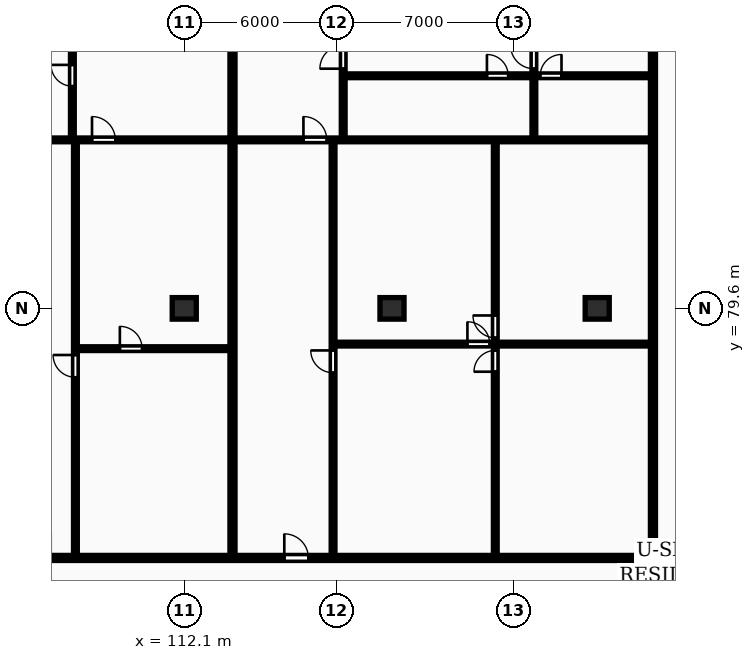
"""IFC4 building model, lengths in metres.
Left out: names, types, materials, properties, quantities, classifications, styles, units other than length and angle.
Written with IfcOpenShell. Run it as: python <this file> out.ifc"""

import sys

from ifc_helpers import new_model, si_unit, direction, frame, frame_2d, origin, origin_2d, place, context, subcontext, project, spatial, rectangle, extrude, element, fill, save


model = new_model("IFC4")
c1 = context("Model", 3, precision=1e-05, world=origin(), true_north=direction((0.0, 1.0)))
c2 = subcontext(c1, "Body", "Model", "MODEL_VIEW")
j1 = project(units=[si_unit("LENGTHUNIT", "METRE"), si_unit("PLANEANGLEUNIT", "RADIAN")], contexts=[c1])
p1 = place(None, origin())
s1 = spatial("IfcSite", under=j1, at=p1, CompositionType="ELEMENT")
p2 = place(p1, origin())
s2 = spatial("IfcBuilding", under=s1, at=p2, CompositionType="ELEMENT")
p3 = place(p2, frame((0.0, 0.0, 100.3)))
s3 = spatial("IfcBuildingStorey", under=s2, at=p3, CompositionType="ELEMENT", Elevation=100.3)
for number, where, z_axis, x_axis in (
    (1, (112.1, 79.6, 0.0), (0.0, 0.0, 1.0), (1.0, 0.0, 0.0)),
    (2, (120.3, 79.6, 0.0), (0.0, 0.0, 1.0), (1.0, 0.0, 0.0)),
    (3, (128.4, 79.6, 0.0), (0.0, 0.0, 1.0), (1.0, 0.0, 0.0)),
):
    element("IfcColumn", number, at=place(p3, frame(where, z_axis=z_axis, x_axis=x_axis)), inside=s3, PredefinedType="COLUMN", context=c2, shape_type="SweptSolid", body=[
        extrude(rectangle(XDim=0.95, YDim=0.85, at=origin_2d()), origin(), (0.0, 0.0, 1.0), 3.25),
    ])
for number, where, z_axis, x_axis in (
    (4, (130.6, 69.83, 0.0), (0.0, 0.0, 1.0), (0.0, 1.0, 0.0)),
    (5, (114.004, 69.83, 0.0), (0.0, 0.0, 1.0), (0.0, 1.0, 0.0)),
):
    element("IfcWall", number, at=place(p3, frame(where, z_axis=z_axis, x_axis=x_axis)), inside=s3, PredefinedType="PARTITIONING", context=c2, shape_type="SweptSolid", body=[
        extrude(rectangle(XDim=26.07, YDim=0.2, at=frame_2d((13.035, 0.0))), origin(), (0.0, 0.0, 1.0), 2.97),
    ])
p4 = place(p3, frame((107.864, 78.01, 0.0), z_axis=(0.0, 0.0, 1.0), x_axis=(1.0, 0.0, 0.0)))
e6 = element("IfcWall", 6, at=p4, inside=s3, PredefinedType="PARTITIONING", context=c2, shape_type="SweptSolid", body=[
    extrude(rectangle(XDim=6.06, YDim=0.15, at=frame_2d((3.03, 0.0))), origin(), (0.0, 0.0, 1.0), 2.97),
])
p5 = place(p4, frame((1.694, 0.0, 0.0)))
e7 = element("IfcOpeningElement", 7, at=p5, cuts=e6, PredefinedType="OPENING", context=c2, shape_type="SweptSolid", body=[
    extrude(rectangle(XDim=0.88, YDim=2.06, at=frame_2d((0.44, 1.03))), frame((0.0, 0.085, 0.0), z_axis=(0.0, -1.0, 0.0), x_axis=(1.0, 0.0, 0.0)), (0.0, 0.0, 1.0), 0.17),
])
p6 = place(p3, frame((107.804, 69.81, 0.0), z_axis=(0.0, 0.0, 1.0), x_axis=(0.0, 1.0, 0.0)))
e8 = element("IfcWall", 8, at=p6, inside=s3, PredefinedType="PARTITIONING", context=c2, shape_type="SweptSolid", body=[
    extrude(rectangle(XDim=16.4, YDim=0.15, at=frame_2d((8.2, 0.0))), origin(), (0.0, 0.0, 1.0), 2.97),
])
p7 = place(p6, frame((7.07, 0.0, 0.0)))
e9 = element("IfcOpeningElement", 9, at=p7, cuts=e8, PredefinedType="OPENING", context=c2, shape_type="SweptSolid", body=[
    extrude(rectangle(XDim=0.88, YDim=2.06, at=frame_2d((0.44, 1.03))), frame((0.0, 0.085, 0.0), z_axis=(0.0, -1.0, 0.0), x_axis=(1.0, 0.0, 0.0)), (0.0, 0.0, 1.0), 0.17),
])
p8 = place(p3, frame((107.684, 86.29, 0.0), z_axis=(0.0, 0.0, 1.0), x_axis=(0.0, 1.0, 0.0)))
e10 = element("IfcWall", 10, at=p8, inside=s3, PredefinedType="PARTITIONING", context=c2, shape_type="SweptSolid", body=[
    extrude(rectangle(XDim=5.0, YDim=0.15, at=frame_2d((2.5, 0.0))), origin(), (0.0, 0.0, 1.0), 2.97),
])
p9 = place(p8, frame((2.08, 0.0, 0.0)))
e11 = element("IfcOpeningElement", 11, at=p9, cuts=e10, PredefinedType="OPENING", context=c2, shape_type="SweptSolid", body=[
    extrude(rectangle(XDim=0.84, YDim=2.04, at=frame_2d((0.42, 1.02))), frame((0.0, 0.085, 0.0), z_axis=(0.0, -1.0, 0.0), x_axis=(1.0, 0.0, 0.0)), (0.0, 0.0, 1.0), 0.17),
])
p10 = place(p3, frame((103.914, 86.25, 0.0), z_axis=(0.0, 0.0, 1.0), x_axis=(1.0, 0.0, 0.0)))
e12 = element("IfcWall", 12, at=p10, inside=s3, PredefinedType="PARTITIONING", context=c2, shape_type="SweptSolid", body=[
    extrude(rectangle(XDim=10.01, YDim=0.15, at=frame_2d((5.005, 0.0))), origin(), (0.0, 0.0, 1.0), 2.97),
])
p11 = place(p10, frame((4.545, 0.0, 0.0)))
e13 = element("IfcOpeningElement", 13, at=p11, cuts=e12, PredefinedType="OPENING", context=c2, shape_type="SweptSolid", body=[
    extrude(rectangle(XDim=0.92, YDim=2.08, at=frame_2d((0.46, 1.04))), frame((0.0, 0.085, 0.0), z_axis=(0.0, -1.0, 0.0), x_axis=(1.0, 0.0, 0.0)), (0.0, 0.0, 1.0), 0.17),
])
p12 = place(p3, frame((124.377, 69.81, 0.0), z_axis=(0.0, 0.0, 1.0), x_axis=(0.0, 1.0, 0.0)))
e14 = element("IfcWall", 14, at=p12, inside=s3, PredefinedType="PARTITIONING", context=c2, shape_type="SweptSolid", body=[
    extrude(rectangle(XDim=16.4, YDim=0.15, at=frame_2d((8.2, 0.0))), origin(), (0.0, 0.0, 1.0), 2.97),
])
p13 = place(p12, frame((7.29, 0.0, 0.0)))
e15 = element("IfcOpeningElement", 15, at=p13, cuts=e14, PredefinedType="OPENING", context=c2, shape_type="SweptSolid", body=[
    extrude(rectangle(XDim=0.84, YDim=2.04, at=frame_2d((0.42, 1.02))), frame((0.0, 0.085, 0.0), z_axis=(0.0, -1.0, 0.0), x_axis=(1.0, 0.0, 0.0)), (0.0, 0.0, 1.0), 0.17),
])
p14 = place(p12, frame((8.63, 0.0, 0.0)))
e16 = element("IfcOpeningElement", 16, at=p14, cuts=e14, PredefinedType="OPENING", context=c2, shape_type="SweptSolid", body=[
    extrude(rectangle(XDim=0.88, YDim=2.06, at=frame_2d((0.44, 1.03))), frame((0.0, 0.085, 0.0), z_axis=(0.0, -1.0, 0.0), x_axis=(1.0, 0.0, 0.0)), (0.0, 0.0, 1.0), 0.17),
])
p15 = place(p3, frame((118.034, 78.19, 0.0), z_axis=(0.0, 0.0, 1.0), x_axis=(1.0, 0.0, 0.0)))
e17 = element("IfcWall", 17, at=p15, inside=s3, PredefinedType="PARTITIONING", context=c2, shape_type="SweptSolid", body=[
    extrude(rectangle(XDim=12.486, YDim=0.15, at=frame_2d((6.243, 0.0))), origin(), (0.0, 0.0, 1.0), 2.97),
])
p16 = place(p15, frame((5.243, 0.0, 0.0)))
e18 = element("IfcOpeningElement", 18, at=p16, cuts=e17, PredefinedType="OPENING", context=c2, shape_type="SweptSolid", body=[
    extrude(rectangle(XDim=0.88, YDim=2.06, at=frame_2d((0.44, 1.03))), frame((0.0, 0.085, 0.0), z_axis=(0.0, -1.0, 0.0), x_axis=(1.0, 0.0, 0.0)), (0.0, 0.0, 1.0), 0.17),
])
p17 = place(p3, frame((117.974, 69.81, 0.0), z_axis=(0.0, 0.0, 1.0), x_axis=(0.0, 1.0, 0.0)))
e19 = element("IfcWall", 19, at=p17, inside=s3, PredefinedType="PARTITIONING", context=c2, shape_type="SweptSolid", body=[
    extrude(rectangle(XDim=16.4, YDim=0.15, at=frame_2d((8.2, 0.0))), origin(), (0.0, 0.0, 1.0), 2.97),
])
p18 = place(p17, frame((7.25, 0.0, 0.0)))
e20 = element("IfcOpeningElement", 20, at=p18, cuts=e19, PredefinedType="OPENING", context=c2, shape_type="SweptSolid", body=[
    extrude(rectangle(XDim=0.88, YDim=2.06, at=frame_2d((0.44, 1.03))), frame((0.0, 0.085, 0.0), z_axis=(0.0, -1.0, 0.0), x_axis=(1.0, 0.0, 0.0)), (0.0, 0.0, 1.0), 0.17),
])
p19 = place(p3, frame((118.374, 86.29, 0.0), z_axis=(0.0, 0.0, 1.0), x_axis=(0.0, 1.0, 0.0)))
e21 = element("IfcWall", 21, at=p19, inside=s3, PredefinedType="PARTITIONING", context=c2, shape_type="SweptSolid", body=[
    extrude(rectangle(XDim=9.61, YDim=0.15, at=frame_2d((4.805, 0.0))), origin(), (0.0, 0.0, 1.0), 2.97),
])
p20 = place(p19, frame((2.77, 0.0, 0.0)))
e22 = element("IfcOpeningElement", 22, at=p20, cuts=e21, PredefinedType="OPENING", context=c2, shape_type="SweptSolid", body=[
    extrude(rectangle(XDim=0.92, YDim=2.08, at=frame_2d((0.46, 1.04))), frame((0.0, 0.085, 0.0), z_axis=(0.0, -1.0, 0.0), x_axis=(1.0, 0.0, 0.0)), (0.0, 0.0, 1.0), 0.17),
])
p21 = place(p3, frame((125.9, 86.29, 0.0), z_axis=(0.0, 0.0, 1.0), x_axis=(0.0, 1.0, 0.0)))
e23 = element("IfcWall", 23, at=p21, inside=s3, PredefinedType="PARTITIONING", context=c2, shape_type="SweptSolid", body=[
    extrude(rectangle(XDim=2.47, YDim=0.15, at=frame_2d((1.235, 0.0))), origin(), (0.0, 0.0, 1.0), 2.97),
])
p22 = place(p3, frame((125.9, 88.8, 0.0), z_axis=(0.0, 0.0, 1.0), x_axis=(0.0, 1.0, 0.0)))
e24 = element("IfcWall", 24, at=p22, inside=s3, PredefinedType="PARTITIONING", context=c2, shape_type="SweptSolid", body=[
    extrude(rectangle(XDim=7.1, YDim=0.15, at=frame_2d((3.55, 0.0))), origin(), (0.0, 0.0, 1.0), 2.97),
])
p23 = place(p22, frame((0.26, 0.0, 0.0)))
e25 = element("IfcOpeningElement", 25, at=p23, cuts=e24, PredefinedType="OPENING", context=c2, shape_type="SweptSolid", body=[
    extrude(rectangle(XDim=0.92, YDim=2.08, at=frame_2d((0.46, 1.04))), frame((0.0, 0.085, 0.0), z_axis=(0.0, -1.0, 0.0), x_axis=(1.0, 0.0, 0.0)), (0.0, 0.0, 1.0), 0.17),
])
p24 = place(p3, frame((118.414, 88.78, 0.0), z_axis=(0.0, 0.0, 1.0), x_axis=(1.0, 0.0, 0.0)))
e26 = element("IfcWall", 26, at=p24, inside=s3, PredefinedType="PARTITIONING", context=c2, shape_type="SweptSolid", body=[
    extrude(rectangle(XDim=12.106, YDim=0.15, at=frame_2d((6.053, 0.0))), origin(), (0.0, 0.0, 1.0), 2.97),
])
p25 = place(p24, frame((5.633, 0.0, 0.0)))
e27 = element("IfcOpeningElement", 27, at=p25, cuts=e26, PredefinedType="OPENING", context=c2, shape_type="SweptSolid", body=[
    extrude(rectangle(XDim=0.84, YDim=2.04, at=frame_2d((0.42, 1.02))), frame((0.0, 0.085, 0.0), z_axis=(0.0, -1.0, 0.0), x_axis=(1.0, 0.0, 0.0)), (0.0, 0.0, 1.0), 0.17),
])
p26 = place(p24, frame((7.736, 0.0, 0.0)))
e28 = element("IfcOpeningElement", 28, at=p26, cuts=e26, PredefinedType="OPENING", context=c2, shape_type="SweptSolid", body=[
    extrude(rectangle(XDim=0.84, YDim=2.04, at=frame_2d((0.42, 1.02))), frame((0.0, 0.085, 0.0), z_axis=(0.0, -1.0, 0.0), x_axis=(1.0, 0.0, 0.0)), (0.0, 0.0, 1.0), 0.17),
])
p27 = place(p3, frame((114.084, 86.25, 0.0), z_axis=(0.0, 0.0, 1.0), x_axis=(1.0, 0.0, 0.0)))
e29 = element("IfcWall", 29, at=p27, inside=s3, PredefinedType="PARTITIONING", context=c2, shape_type="SweptSolid", body=[
    extrude(rectangle(XDim=16.436, YDim=0.15, at=frame_2d((8.218, 0.0))), origin(), (0.0, 0.0, 1.0), 2.97),
])
p28 = place(p27, frame((2.72, 0.0, 0.0)))
e30 = element("IfcOpeningElement", 30, at=p28, cuts=e29, PredefinedType="OPENING", context=c2, shape_type="SweptSolid", body=[
    extrude(rectangle(XDim=0.92, YDim=2.08, at=frame_2d((0.46, 1.04))), frame((0.0, 0.085, 0.0), z_axis=(0.0, -1.0, 0.0), x_axis=(1.0, 0.0, 0.0)), (0.0, 0.0, 1.0), 0.17),
])
p29 = place(p3, frame((57.6, 69.75, 0.0), z_axis=(0.0, 0.0, 1.0), x_axis=(1.0, 0.0, 0.0)))
e31 = element("IfcWall", 31, at=p29, inside=s3, PredefinedType="PARTITIONING", context=c2, shape_type="SweptSolid", body=[
    extrude(rectangle(XDim=73.0, YDim=0.2, at=frame_2d((36.5, 0.0))), origin(), (0.0, 0.0, 1.0), 2.97),
])
p30 = place(p29, frame((7.326, 0.0, 0.0)))
e32 = element("IfcOpeningElement", 32, at=p30, cuts=e31, PredefinedType="OPENING", context=c2, shape_type="SweptSolid", body=[
    extrude(rectangle(XDim=1.22, YDim=2.18, at=frame_2d((0.61, 1.09))), frame((0.0, 0.11, 0.0), z_axis=(0.0, -1.0, 0.0), x_axis=(1.0, 0.0, 0.0)), (0.0, 0.0, 1.0), 0.22),
])
p31 = place(p29, frame((23.795, 0.0, 0.0)))
e33 = element("IfcOpeningElement", 33, at=p31, cuts=e31, PredefinedType="OPENING", context=c2, shape_type="SweptSolid", body=[
    extrude(rectangle(XDim=1.22, YDim=2.18, at=frame_2d((0.61, 1.09))), frame((0.0, 0.11, 0.0), z_axis=(0.0, -1.0, 0.0), x_axis=(1.0, 0.0, 0.0)), (0.0, 0.0, 1.0), 0.22),
])
p32 = place(p29, frame((38.67, 0.0, 0.0)))
e34 = element("IfcOpeningElement", 34, at=p32, cuts=e31, PredefinedType="OPENING", context=c2, shape_type="SweptSolid", body=[
    extrude(rectangle(XDim=0.95, YDim=2.15, at=frame_2d((0.475, 1.075))), frame((0.0, 0.11, 0.0), z_axis=(0.0, -1.0, 0.0), x_axis=(1.0, 0.0, 0.0)), (0.0, 0.0, 1.0), 0.22),
])
p33 = place(p29, frame((48.279, 0.0, 0.0)))
e35 = element("IfcOpeningElement", 35, at=p33, cuts=e31, PredefinedType="OPENING", context=c2, shape_type="SweptSolid", body=[
    extrude(rectangle(XDim=0.95, YDim=2.15, at=frame_2d((0.475, 1.075))), frame((0.0, 0.11, 0.0), z_axis=(0.0, -1.0, 0.0), x_axis=(1.0, 0.0, 0.0)), (0.0, 0.0, 1.0), 0.22),
])
p34 = place(p29, frame((58.449, 0.0, 0.0)))
e36 = element("IfcOpeningElement", 36, at=p34, cuts=e31, PredefinedType="OPENING", context=c2, shape_type="SweptSolid", body=[
    extrude(rectangle(XDim=0.95, YDim=2.15, at=frame_2d((0.475, 1.075))), frame((0.0, 0.11, 0.0), z_axis=(0.0, -1.0, 0.0), x_axis=(1.0, 0.0, 0.0)), (0.0, 0.0, 1.0), 0.22),
])
p35 = place(p5, origin())
e37 = element("IfcDoor", 37, at=p35, inside=s3, OperationType="SINGLE_SWING_LEFT", PredefinedType="DOOR", context=c2, shape_type="SweptSolid", body=[
    extrude(rectangle(XDim=0.88, YDim=2.06, at=frame_2d((0.44, 1.03))), frame((0.0, 0.025, 0.0), z_axis=(0.0, -1.0, 0.0), x_axis=(1.0, 0.0, 0.0)), (0.0, 0.0, 1.0), 0.05),
])
fill(e7, e37)
p36 = place(p7, origin())
e38 = element("IfcDoor", 38, at=p36, inside=s3, OperationType="SINGLE_SWING_RIGHT", PredefinedType="DOOR", context=c2, shape_type="SweptSolid", body=[
    extrude(rectangle(XDim=0.88, YDim=2.06, at=frame_2d((0.44, 1.03))), frame((0.0, 0.025, 0.0), z_axis=(0.0, -1.0, 0.0), x_axis=(1.0, 0.0, 0.0)), (0.0, 0.0, 1.0), 0.05),
])
fill(e9, e38)
p37 = place(p9, origin())
e39 = element("IfcDoor", 39, at=p37, inside=s3, OperationType="SINGLE_SWING_RIGHT", PredefinedType="DOOR", context=c2, shape_type="SweptSolid", body=[
    extrude(rectangle(XDim=0.84, YDim=2.04, at=frame_2d((0.42, 1.02))), frame((0.0, 0.025, 0.0), z_axis=(0.0, -1.0, 0.0), x_axis=(1.0, 0.0, 0.0)), (0.0, 0.0, 1.0), 0.05),
])
fill(e11, e39)
p38 = place(p11, origin())
e40 = element("IfcDoor", 40, at=p38, inside=s3, OperationType="SINGLE_SWING_LEFT", PredefinedType="DOOR", context=c2, shape_type="SweptSolid", body=[
    extrude(rectangle(XDim=0.92, YDim=2.08, at=frame_2d((0.46, 1.04))), frame((0.0, 0.025, 0.0), z_axis=(0.0, -1.0, 0.0), x_axis=(1.0, 0.0, 0.0)), (0.0, 0.0, 1.0), 0.05),
])
fill(e13, e40)
p39 = place(p13, origin())
e41 = element("IfcDoor", 41, at=p39, inside=s3, OperationType="SINGLE_SWING_LEFT", PredefinedType="DOOR", context=c2, shape_type="SweptSolid", body=[
    extrude(rectangle(XDim=0.84, YDim=2.04, at=frame_2d((0.42, 1.02))), frame((0.0, 0.025, 0.0), z_axis=(0.0, -1.0, 0.0), x_axis=(1.0, 0.0, 0.0)), (0.0, 0.0, 1.0), 0.05),
])
fill(e15, e41)
p40 = place(p14, origin())
e42 = element("IfcDoor", 42, at=p40, inside=s3, OperationType="SINGLE_SWING_RIGHT", PredefinedType="DOOR", context=c2, shape_type="SweptSolid", body=[
    extrude(rectangle(XDim=0.88, YDim=2.06, at=frame_2d((0.44, 1.03))), frame((0.0, 0.025, 0.0), z_axis=(0.0, -1.0, 0.0), x_axis=(1.0, 0.0, 0.0)), (0.0, 0.0, 1.0), 0.05),
])
fill(e16, e42)
p41 = place(p16, origin())
e43 = element("IfcDoor", 43, at=p41, inside=s3, OperationType="SINGLE_SWING_LEFT", PredefinedType="DOOR", context=c2, shape_type="SweptSolid", body=[
    extrude(rectangle(XDim=0.88, YDim=2.06, at=frame_2d((0.44, 1.03))), frame((0.0, 0.025, 0.0), z_axis=(0.0, -1.0, 0.0), x_axis=(1.0, 0.0, 0.0)), (0.0, 0.0, 1.0), 0.05),
])
fill(e18, e43)
p42 = place(p18, origin())
e44 = element("IfcDoor", 44, at=p42, inside=s3, OperationType="SINGLE_SWING_RIGHT", PredefinedType="DOOR", context=c2, shape_type="SweptSolid", body=[
    extrude(rectangle(XDim=0.88, YDim=2.06, at=frame_2d((0.44, 1.03))), frame((0.0, 0.025, 0.0), z_axis=(0.0, -1.0, 0.0), x_axis=(1.0, 0.0, 0.0)), (0.0, 0.0, 1.0), 0.05),
])
fill(e20, e44)
p43 = place(p20, origin())
e45 = element("IfcDoor", 45, at=p43, inside=s3, OperationType="SINGLE_SWING_LEFT", PredefinedType="DOOR", context=c2, shape_type="SweptSolid", body=[
    extrude(rectangle(XDim=0.92, YDim=2.08, at=frame_2d((0.46, 1.04))), frame((0.0, 0.025, 0.0), z_axis=(0.0, -1.0, 0.0), x_axis=(1.0, 0.0, 0.0)), (0.0, 0.0, 1.0), 0.05),
])
fill(e22, e45)
p44 = place(p23, origin())
e46 = element("IfcDoor", 46, at=p44, inside=s3, OperationType="SINGLE_SWING_RIGHT", PredefinedType="DOOR", context=c2, shape_type="SweptSolid", body=[
    extrude(rectangle(XDim=0.92, YDim=2.08, at=frame_2d((0.46, 1.04))), frame((0.0, 0.025, 0.0), z_axis=(0.0, -1.0, 0.0), x_axis=(1.0, 0.0, 0.0)), (0.0, 0.0, 1.0), 0.05),
])
fill(e25, e46)
p45 = place(p25, origin())
e47 = element("IfcDoor", 47, at=p45, inside=s3, OperationType="SINGLE_SWING_LEFT", PredefinedType="DOOR", context=c2, shape_type="SweptSolid", body=[
    extrude(rectangle(XDim=0.84, YDim=2.04, at=frame_2d((0.42, 1.02))), frame((0.0, 0.025, 0.0), z_axis=(0.0, -1.0, 0.0), x_axis=(1.0, 0.0, 0.0)), (0.0, 0.0, 1.0), 0.05),
])
fill(e27, e47)
p46 = place(p26, origin())
e48 = element("IfcDoor", 48, at=p46, inside=s3, OperationType="SINGLE_SWING_RIGHT", PredefinedType="DOOR", context=c2, shape_type="SweptSolid", body=[
    extrude(rectangle(XDim=0.84, YDim=2.04, at=frame_2d((0.42, 1.02))), frame((0.0, 0.025, 0.0), z_axis=(0.0, -1.0, 0.0), x_axis=(1.0, 0.0, 0.0)), (0.0, 0.0, 1.0), 0.05),
])
fill(e28, e48)
p47 = place(p28, origin())
e49 = element("IfcDoor", 49, at=p47, inside=s3, OperationType="SINGLE_SWING_LEFT", PredefinedType="DOOR", context=c2, shape_type="SweptSolid", body=[
    extrude(rectangle(XDim=0.92, YDim=2.08, at=frame_2d((0.46, 1.04))), frame((0.0, 0.025, 0.0), z_axis=(0.0, -1.0, 0.0), x_axis=(1.0, 0.0, 0.0)), (0.0, 0.0, 1.0), 0.05),
])
fill(e30, e49)
p48 = place(p34, origin())
e50 = element("IfcDoor", 50, at=p48, inside=s3, OperationType="SINGLE_SWING_LEFT", PredefinedType="DOOR", context=c2, shape_type="SweptSolid", body=[
    extrude(rectangle(XDim=0.95, YDim=2.15, at=frame_2d((0.475, 1.075))), frame((0.0, 0.025, 0.0), z_axis=(0.0, -1.0, 0.0), x_axis=(1.0, 0.0, 0.0)), (0.0, 0.0, 1.0), 0.05),
])
fill(e36, e50)
save(model, sys.argv[1])
